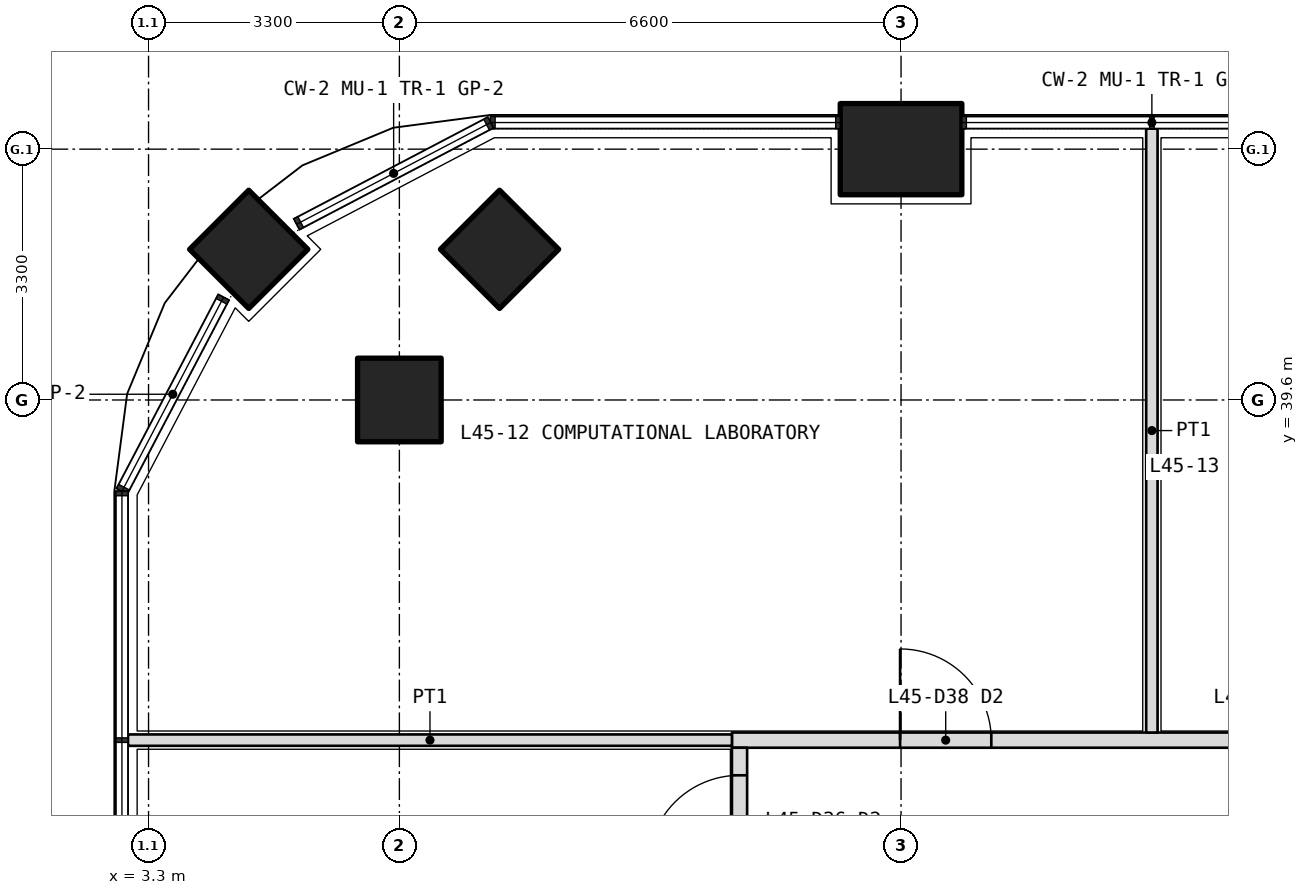
"""IFC4 building model, lengths in metres.
Left out: names, types, materials, properties, quantities, classifications, styles, units other than length and angle.
Written with IfcOpenShell. Run it as: python <this file> out.ifc"""

import sys

from ifc_helpers import new_model, si_unit, direction, frame, frame_2d, origin, origin_2d, place, context, subcontext, project, spatial, rectangle, extrude, element, fill, save


model = new_model("IFC4")
c1 = context("Model", 3, precision=1e-05, world=origin(), true_north=direction((0.0, 1.0)))
c2 = subcontext(c1, "Body", "Model", "MODEL_VIEW")
j1 = project(units=[si_unit("LENGTHUNIT", "METRE"), si_unit("PLANEANGLEUNIT", "RADIAN")], contexts=[c1])
p1 = place(None, origin())
s1 = spatial("IfcSite", under=j1, at=p1, CompositionType="ELEMENT")
p2 = place(p1, origin())
s2 = spatial("IfcBuilding", under=s1, at=p2, CompositionType="ELEMENT")
p3 = place(p2, frame((0.0, 0.0, 197.7)))
s3 = spatial("IfcBuildingStorey", under=s2, at=p3, CompositionType="ELEMENT", Elevation=197.7)
p4 = place(p3, frame((4.618, 41.582, 0.0), z_axis=(0.0, 0.0, 1.0), x_axis=(0.707106781187, 0.707106781187, 0.0)))
e1 = element("IfcColumn", 1, at=p4, inside=s3, PredefinedType="COLUMN", context=c2, shape_type="SweptSolid", body=[
    extrude(rectangle(XDim=1.1, YDim=1.1, at=origin_2d()), origin(), (0.0, 0.0, 1.0), 4.2),
])
p5 = place(p3, frame((13.2, 42.9, 0.0), z_axis=(0.0, 0.0, 1.0), x_axis=(1.0, 0.0, 0.0)))
e2 = element("IfcColumn", 2, at=p5, inside=s3, PredefinedType="COLUMN", context=c2, shape_type="SweptSolid", body=[
    extrude(rectangle(XDim=1.6, YDim=1.2, at=origin_2d()), origin(), (0.0, 0.0, 1.0), 4.2),
])
for number, where, z_axis, x_axis in (
    (3, (6.6, 39.6, 0.0), (0.0, 0.0, 1.0), (1.0, 0.0, 0.0)),
    (4, (7.918, 41.582, 0.0), (0.0, 0.0, 1.0), (0.707, 0.707, 0.0)),
):
    element("IfcColumn", number, at=place(p3, frame(where, z_axis=z_axis, x_axis=x_axis)), inside=s3, PredefinedType="COLUMN", context=c2, shape_type="SweptSolid", body=[
        extrude(rectangle(XDim=1.1, YDim=1.1, at=origin_2d()), origin(), (0.0, 0.0, 1.0), 4.2),
    ])
p6 = place(p3, frame((10.975, 35.125, 0.0), z_axis=(0.0, 0.0, 1.0), x_axis=(1.0, 0.0, 0.0)))
e5 = element("IfcWall", 5, at=p6, inside=s3, PredefinedType="PARTITIONING", context=c2, shape_type="SweptSolid", body=[
    extrude(rectangle(XDim=30.85, YDim=0.2, at=frame_2d((15.425, 0.0))), origin(), (0.0, 0.0, 1.0), 2.85),
])
p7 = place(p6, frame((2.212, 0.0, 0.0)))
e6 = element("IfcOpeningElement", 6, at=p7, cuts=e5, PredefinedType="OPENING", context=c2, shape_type="SweptSolid", body=[
    extrude(rectangle(XDim=1.2, YDim=2.1, at=frame_2d((0.6, 1.05))), frame((0.0, 0.11, 0.0), z_axis=(0.0, -1.0, 0.0), x_axis=(1.0, 0.0, 0.0)), (0.0, 0.0, 1.0), 0.22),
])
p8 = place(p6, frame((6.675, 0.0, 0.0)))
e7 = element("IfcOpeningElement", 7, at=p8, cuts=e5, PredefinedType="OPENING", context=c2, shape_type="SweptSolid", body=[
    extrude(rectangle(XDim=1.0, YDim=2.1, at=frame_2d((0.5, 1.05))), frame((0.0, 0.11, 0.0), z_axis=(0.0, -1.0, 0.0), x_axis=(1.0, 0.0, 0.0)), (0.0, 0.0, 1.0), 0.22),
])
p9 = place(p6, frame((14.925, 0.0, 0.0)))
e8 = element("IfcOpeningElement", 8, at=p9, cuts=e5, PredefinedType="OPENING", context=c2, shape_type="SweptSolid", body=[
    extrude(rectangle(XDim=1.0, YDim=2.1, at=frame_2d((0.5, 1.05))), frame((0.0, 0.11, 0.0), z_axis=(0.0, -1.0, 0.0), x_axis=(1.0, 0.0, 0.0)), (0.0, 0.0, 1.0), 0.22),
])
p10 = place(p6, frame((25.788, 0.0, 0.0)))
e9 = element("IfcOpeningElement", 9, at=p10, cuts=e5, PredefinedType="OPENING", context=c2, shape_type="SweptSolid", body=[
    extrude(rectangle(XDim=1.2, YDim=2.1, at=frame_2d((0.6, 1.05))), frame((0.0, 0.11, 0.0), z_axis=(0.0, -1.0, 0.0), x_axis=(1.0, 0.0, 0.0)), (0.0, 0.0, 1.0), 0.22),
])
p11 = place(p3, frame((11.075, 11.175, 0.0), z_axis=(0.0, 0.0, 1.0), x_axis=(0.0, 1.0, 0.0)))
e10 = element("IfcWall", 10, at=p11, inside=s3, PredefinedType="PARTITIONING", context=c2, shape_type="SweptSolid", body=[
    extrude(rectangle(XDim=23.85, YDim=0.2, at=frame_2d((11.925, 0.0))), origin(), (0.0, 0.0, 1.0), 2.85),
])
p12 = place(p11, frame((0.462, 0.0, 0.0)))
e11 = element("IfcOpeningElement", 11, at=p12, cuts=e10, PredefinedType="OPENING", context=c2, shape_type="SweptSolid", body=[
    extrude(rectangle(XDim=1.0, YDim=2.1, at=frame_2d((0.5, 1.05))), frame((0.0, 0.11, 0.0), z_axis=(0.0, -1.0, 0.0), x_axis=(1.0, 0.0, 0.0)), (0.0, 0.0, 1.0), 0.22),
])
p13 = place(p11, frame((2.575, 0.0, 0.0)))
e12 = element("IfcOpeningElement", 12, at=p13, cuts=e10, PredefinedType="OPENING", context=c2, shape_type="SweptSolid", body=[
    extrude(rectangle(XDim=1.0, YDim=2.1, at=frame_2d((0.5, 1.05))), frame((0.0, 0.11, 0.0), z_axis=(0.0, -1.0, 0.0), x_axis=(1.0, 0.0, 0.0)), (0.0, 0.0, 1.0), 0.22),
])
p14 = place(p11, frame((5.625, 0.0, 0.0)))
e13 = element("IfcOpeningElement", 13, at=p14, cuts=e10, PredefinedType="OPENING", context=c2, shape_type="SweptSolid", body=[
    extrude(rectangle(XDim=0.9, YDim=2.1, at=frame_2d((0.45, 1.05))), frame((0.0, 0.11, 0.0), z_axis=(0.0, -1.0, 0.0), x_axis=(1.0, 0.0, 0.0)), (0.0, 0.0, 1.0), 0.22),
])
p15 = place(p11, frame((9.425, 0.0, 0.0)))
e14 = element("IfcOpeningElement", 14, at=p15, cuts=e10, PredefinedType="OPENING", context=c2, shape_type="SweptSolid", body=[
    extrude(rectangle(XDim=0.9, YDim=2.1, at=frame_2d((0.45, 1.05))), frame((0.0, 0.11, 0.0), z_axis=(0.0, -1.0, 0.0), x_axis=(1.0, 0.0, 0.0)), (0.0, 0.0, 1.0), 0.22),
])
p16 = place(p11, frame((12.975, 0.0, 0.0)))
e15 = element("IfcOpeningElement", 15, at=p16, cuts=e10, PredefinedType="OPENING", context=c2, shape_type="SweptSolid", body=[
    extrude(rectangle(XDim=1.0, YDim=2.1, at=frame_2d((0.5, 1.05))), frame((0.0, 0.11, 0.0), z_axis=(0.0, -1.0, 0.0), x_axis=(1.0, 0.0, 0.0)), (0.0, 0.0, 1.0), 0.22),
])
p17 = place(p11, frame((17.925, 0.0, 0.0)))
e16 = element("IfcOpeningElement", 16, at=p17, cuts=e10, PredefinedType="OPENING", context=c2, shape_type="SweptSolid", body=[
    extrude(rectangle(XDim=1.2, YDim=2.1, at=frame_2d((0.6, 1.05))), frame((0.0, 0.11, 0.0), z_axis=(0.0, -1.0, 0.0), x_axis=(1.0, 0.0, 0.0)), (0.0, 0.0, 1.0), 0.22),
])
p18 = place(p11, frame((22.288, 0.0, 0.0)))
e17 = element("IfcOpeningElement", 17, at=p18, cuts=e10, PredefinedType="OPENING", context=c2, shape_type="SweptSolid", body=[
    extrude(rectangle(XDim=1.2, YDim=2.1, at=frame_2d((0.6, 1.05))), frame((0.0, 0.11, 0.0), z_axis=(0.0, -1.0, 0.0), x_axis=(1.0, 0.0, 0.0)), (0.0, 0.0, 1.0), 0.22),
])
p19 = place(p3, frame((3.03, 35.125, 0.0), z_axis=(0.0, 0.0, 1.0), x_axis=(1.0, 0.0, 0.0)))
e18 = element("IfcWall", 18, at=p19, inside=s3, PredefinedType="PARTITIONING", context=c2, shape_type="SweptSolid", body=[
    extrude(rectangle(XDim=7.945, YDim=0.15, at=frame_2d((3.973, 0.0))), origin(), (0.0, 0.0, 1.0), 2.7),
])
p20 = place(p3, frame((16.5, 43.17, 0.0), z_axis=(0.0, 0.0, 1.0), x_axis=(0.0, -1.0, 0.0)))
e19 = element("IfcWall", 19, at=p20, inside=s3, PredefinedType="PARTITIONING", context=c2, shape_type="SweptSolid", body=[
    extrude(rectangle(XDim=7.945, YDim=0.15, at=frame_2d((3.972, 0.0))), origin(), (0.0, 0.0, 1.0), 2.7),
])
p21 = place(p7, origin())
e20 = element("IfcDoor", 20, at=p21, inside=s3, OperationType="DOUBLE_DOOR_SINGLE_SWING", PredefinedType="DOOR", context=c2, shape_type="SweptSolid", body=[
    extrude(rectangle(XDim=1.2, YDim=2.1, at=frame_2d((0.6, 1.05))), frame((0.0, 0.025, 0.0), z_axis=(0.0, -1.0, 0.0), x_axis=(1.0, 0.0, 0.0)), (0.0, 0.0, 1.0), 0.05),
])
fill(e6, e20)
p22 = place(p18, origin())
e21 = element("IfcDoor", 21, at=p22, inside=s3, OperationType="DOUBLE_DOOR_SINGLE_SWING", PredefinedType="DOOR", context=c2, shape_type="SweptSolid", body=[
    extrude(rectangle(XDim=1.2, YDim=2.1, at=frame_2d((0.6, 1.05))), frame((0.0, 0.025, 0.0), z_axis=(0.0, -1.0, 0.0), x_axis=(1.0, 0.0, 0.0)), (0.0, 0.0, 1.0), 0.05),
])
fill(e17, e21)
save(model, sys.argv[1])
